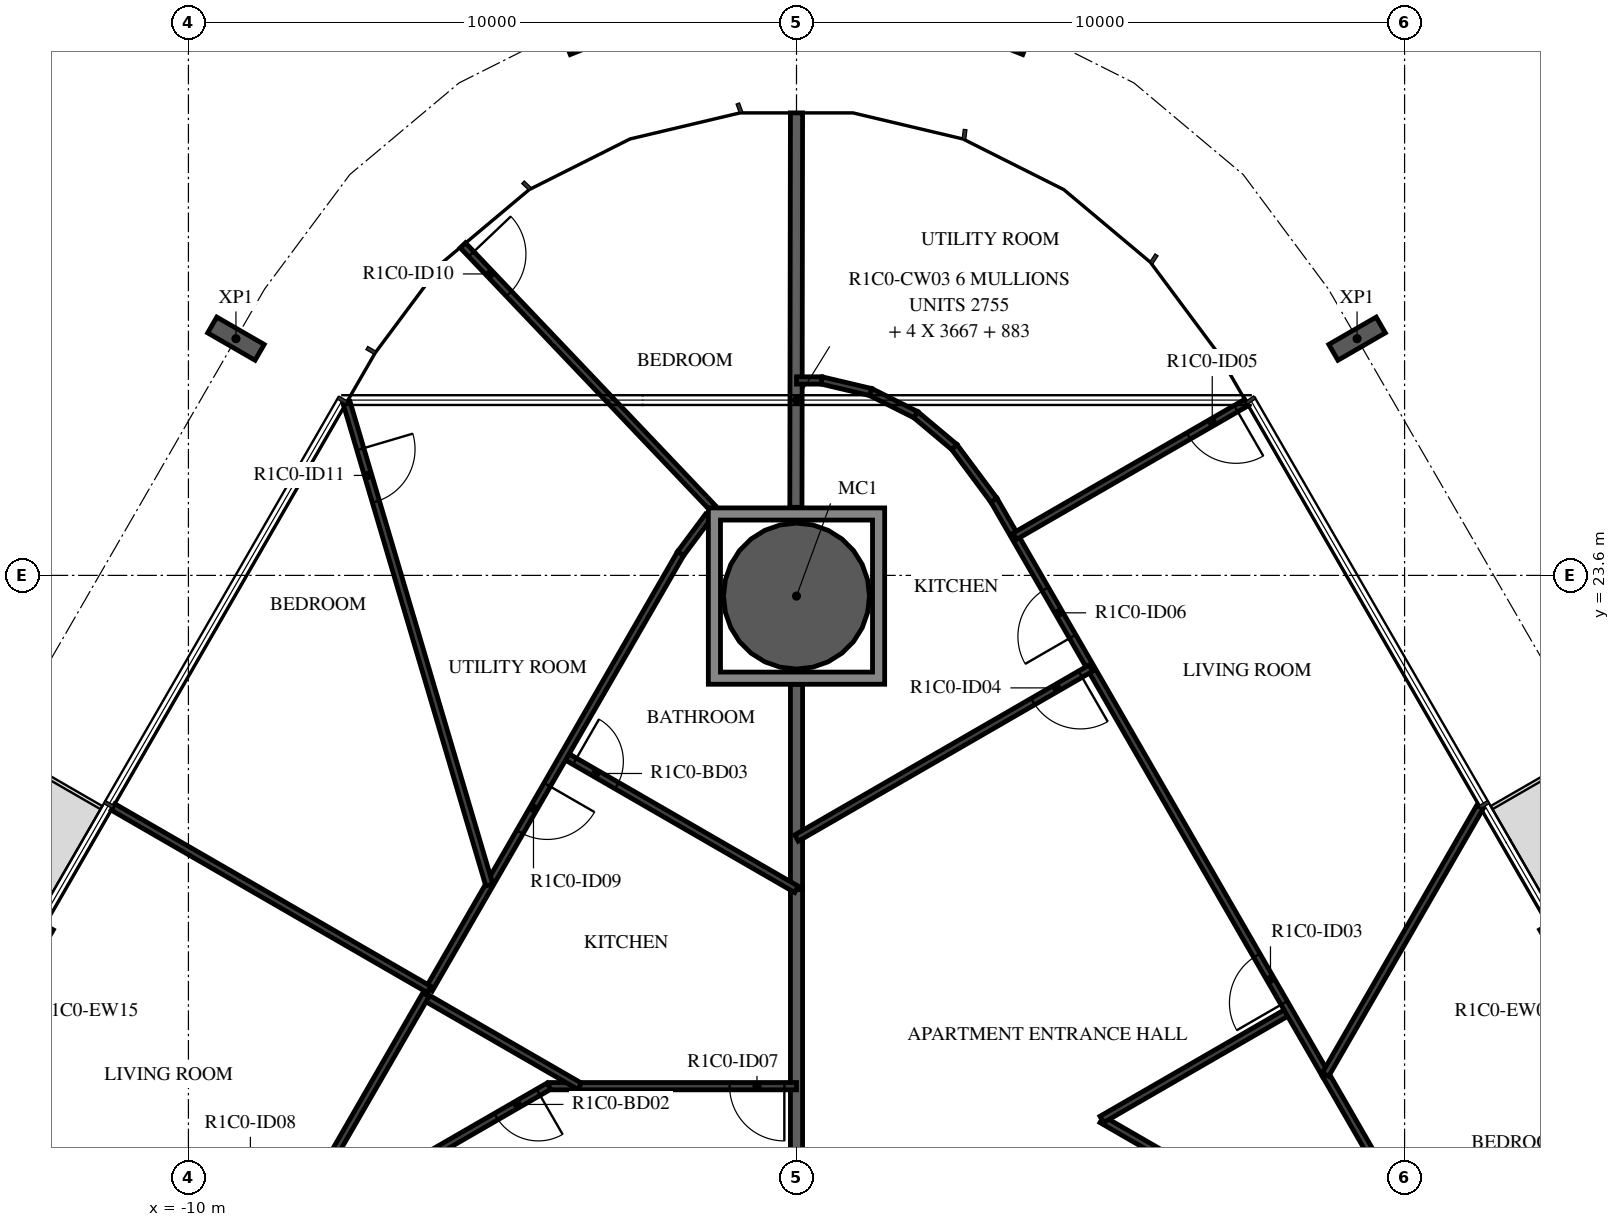
"""IFC4 building model, lengths in metres.
Left out: names, types, materials, properties, quantities, classifications, styles, units other than length and angle.
Written with IfcOpenShell. Run it as: python <this file> out.ifc"""

import sys

from ifc_helpers import new_model, si_unit, direction, frame, frame_2d, origin, origin_2d, place, context, subcontext, project, spatial, polyline, rectangle, hollow_circle, i_section, outline, extrude, element, fill, save


model = new_model("IFC4")
c1 = context("Model", 3, precision=1e-05, world=origin(), true_north=direction((0.0, 1.0)))
c2 = subcontext(c1, "Body", "Model", "MODEL_VIEW")
j1 = project(units=[si_unit("LENGTHUNIT", "METRE"), si_unit("PLANEANGLEUNIT", "RADIAN")], contexts=[c1])
p1 = place(None, origin())
s1 = spatial("IfcSite", under=j1, at=p1, CompositionType="ELEMENT")
p2 = place(p1, origin())
s2 = spatial("IfcBuilding", under=s1, at=p2, CompositionType="ELEMENT")
p3 = place(p2, frame((0.0, 0.0, 66.4)))
s3 = spatial("IfcBuildingStorey", under=s2, at=p3, CompositionType="ELEMENT", Elevation=66.4)
p4 = place(p3, frame((0.0, 23.26, -0.38), z_axis=(0.0, 0.0, 1.0), x_axis=(1.0, 0.0, 0.0)))
e1 = element("IfcColumn", 1, at=p4, inside=s3, PredefinedType="COLUMN", context=c2, shape_type="SweptSolid", body=[
    extrude(hollow_circle(Radius=1.2, WallThickness=0.06, at=origin_2d()), origin(), (0.0, 0.0, 1.0), 2.576),
])
for number, where, z_axis, x_axis in (
    (2, (9.219, 27.493, -0.38), (0.0, 0.0, 1.0), (0.5, -0.866, 0.0)),
    (3, (3.748, 32.639, -0.38), (0.0, 0.0, 1.0), (0.929, -0.371, 0.0)),
    (4, (-3.748, 32.639, -0.38), (0.0, 0.0, 1.0), (0.929, 0.371, 0.0)),
    (5, (-9.219, 27.493, -0.38), (0.0, 0.0, 1.0), (0.5, 0.866, 0.0)),
):
    element("IfcColumn", number, at=place(p3, frame(where, z_axis=z_axis, x_axis=x_axis)), inside=s3, PredefinedType="COLUMN", context=c2, shape_type="SweptSolid", body=[
        extrude(i_section(OverallWidth=0.3, OverallDepth=0.9, WebThickness=0.019, FlangeThickness=0.035, FilletRadius=0.03, at=origin_2d()), origin(), (0.0, 0.0, 1.0), 2.616),
    ])
p5 = place(p3, frame((13.891, 15.041, 0.0), z_axis=(0.0, 0.0, 1.0), x_axis=(-0.499971222258, 0.866042017984, 0.0)))
e6 = element("IfcWall", 6, at=p5, inside=s3, PredefinedType="STANDARD", context=c2, shape_type="SweptSolid", body=[
    extrude(rectangle(XDim=3.2, YDim=0.16, at=frame_2d((1.6, 0.0))), origin(), (0.0, 0.0, 1.0), 3.05),
])
p6 = place(p5, frame((0.4, 0.0, 0.0)))
e7 = element("IfcOpeningElement", 7, at=p6, cuts=e6, PredefinedType="OPENING", context=c2, shape_type="SweptSolid", body=[
    extrude(rectangle(XDim=2.4, YDim=2.4, at=frame_2d((1.2, 1.2))), frame((0.0, 0.09, 0.0), z_axis=(0.0, -1.0, 0.0), x_axis=(1.0, 0.0, 0.0)), (0.0, 0.0, 1.0), 0.18),
])
p7 = place(p3, frame((-12.291, 17.812, 0.0), z_axis=(0.0, 0.0, 1.0), x_axis=(-0.499971222258, -0.866042017984, 0.0)))
e8 = element("IfcWall", 8, at=p7, inside=s3, PredefinedType="STANDARD", context=c2, shape_type="SweptSolid", body=[
    extrude(rectangle(XDim=3.2, YDim=0.16, at=frame_2d((1.6, 0.0))), origin(), (0.0, 0.0, 1.0), 3.05),
])
p8 = place(p7, frame((0.4, 0.0, 0.0)))
e9 = element("IfcOpeningElement", 9, at=p8, cuts=e8, PredefinedType="OPENING", context=c2, shape_type="SweptSolid", body=[
    extrude(rectangle(XDim=2.4, YDim=2.4, at=frame_2d((1.2, 1.2))), frame((0.0, 0.09, 0.0), z_axis=(0.0, -1.0, 0.0), x_axis=(1.0, 0.0, 0.0)), (0.0, 0.0, 1.0), 0.18),
])
p9 = place(p3, frame((0.0, 18.437, 0.0), z_axis=(0.0, 0.0, 1.0), x_axis=(0.0, -1.0, 0.0)))
e10 = element("IfcWall", 10, at=p9, inside=s3, PredefinedType="STANDARD", context=c2, shape_type="SweptSolid", body=[
    extrude(rectangle(XDim=4.737, YDim=0.2, at=frame_2d((2.368, 0.0))), origin(), (0.0, 0.0, 1.0), 3.05),
])
p10 = place(p3, frame((0.0, 21.81, 0.0), z_axis=(0.0, 0.0, 1.0), x_axis=(0.0, -1.0, 0.0)))
e11 = element("IfcWall", 11, at=p10, inside=s3, PredefinedType="STANDARD", context=c2, shape_type="SweptSolid", body=[
    extrude(rectangle(XDim=3.373, YDim=0.2, at=frame_2d((1.687, 0.0))), origin(), (0.0, 0.0, 1.0), 3.05),
])
p11 = place(p3, frame((0.0, 31.206, 0.0), z_axis=(0.0, 0.0, 1.0), x_axis=(-0.001543266126, -0.999998809164, 0.0)))
e12 = element("IfcWall", 12, at=p11, inside=s3, PredefinedType="STANDARD", context=c2, shape_type="SweptSolid", body=[
    extrude(rectangle(XDim=6.486, YDim=0.2, at=frame_2d((3.243, 0.0))), origin(), (0.0, 0.0, 1.0), 3.05),
])
p12 = place(p3, frame((11.127, 11.127, 0.0), z_axis=(0.0, 0.0, 1.0), x_axis=(-0.86602299963, 0.500004164094, 0.0)))
e13 = element("IfcWall", 13, at=p12, inside=s3, PredefinedType="PARTITIONING", context=c2, shape_type="SweptSolid", body=[
    extrude(rectangle(XDim=7.052, YDim=0.12, at=frame_2d((3.526, 0.0))), origin(), (0.0, 0.0, 1.0), 3.05),
])
p13 = place(p12, frame((1.4, 0.0, 0.0)))
e14 = element("IfcOpeningElement", 14, at=p13, cuts=e13, PredefinedType="OPENING", context=c2, shape_type="SweptSolid", body=[
    extrude(rectangle(XDim=0.8, YDim=2.1, at=frame_2d((0.4, 1.05))), frame((0.0, 0.07, 0.0), z_axis=(0.0, -1.0, 0.0), x_axis=(1.0, 0.0, 0.0)), (0.0, 0.0, 1.0), 0.14),
])
p14 = place(p3, frame((5.02, 14.653, 0.0), z_axis=(0.0, 0.0, 1.0), x_axis=(0.866028940167, 0.499993874756, 0.0)))
e15 = element("IfcWall", 15, at=p14, inside=s3, PredefinedType="PARTITIONING", context=c2, shape_type="SweptSolid", body=[
    extrude(rectangle(XDim=3.556, YDim=0.12, at=frame_2d((1.778, 0.0))), origin(), (0.0, 0.0, 1.0), 3.05),
])
p15 = place(p3, frame((8.7, 15.392, 0.0), z_axis=(0.0, 0.0, 1.0), x_axis=(-0.500002742713, 0.866023820272, 0.0)))
e16 = element("IfcWall", 16, at=p15, inside=s3, PredefinedType="PARTITIONING", context=c2, shape_type="SweptSolid", body=[
    extrude(rectangle(XDim=10.908, YDim=0.12, at=frame_2d((5.454, 0.0))), origin(), (0.0, 0.0, 1.0), 3.05),
])
p16 = place(p15, frame((1.36, 0.0, 0.0)))
e17 = element("IfcOpeningElement", 17, at=p16, cuts=e16, PredefinedType="OPENING", context=c2, shape_type="SweptSolid", body=[
    extrude(rectangle(XDim=0.9, YDim=2.1, at=frame_2d((0.45, 1.05))), frame((0.0, 0.07, 0.0), z_axis=(0.0, -1.0, 0.0), x_axis=(1.0, 0.0, 0.0)), (0.0, 0.0, 1.0), 0.14),
])
p17 = place(p15, frame((8.317, 0.0, 0.0)))
e18 = element("IfcOpeningElement", 18, at=p17, cuts=e16, PredefinedType="OPENING", context=c2, shape_type="SweptSolid", body=[
    extrude(rectangle(XDim=0.9, YDim=2.1, at=frame_2d((0.45, 1.05))), frame((0.0, 0.07, 0.0), z_axis=(0.0, -1.0, 0.0), x_axis=(1.0, 0.0, 0.0)), (0.0, 0.0, 1.0), 0.14),
])
p18 = place(p3, frame((4.841, 22.075, 0.0), z_axis=(0.0, 0.0, 1.0), x_axis=(-0.866019751484, -0.500009789943, 0.0)))
e19 = element("IfcWall", 19, at=p18, inside=s3, PredefinedType="PARTITIONING", context=c2, shape_type="SweptSolid", body=[
    extrude(rectangle(XDim=5.59, YDim=0.12, at=frame_2d((2.795, 0.0))), origin(), (0.0, 0.0, 1.0), 3.05),
])
p19 = place(p18, frame((0.2, 0.0, 0.0)))
e20 = element("IfcOpeningElement", 20, at=p19, cuts=e19, PredefinedType="OPENING", context=c2, shape_type="SweptSolid", body=[
    extrude(rectangle(XDim=0.9, YDim=2.1, at=frame_2d((0.45, 1.05))), frame((0.0, 0.07, 0.0), z_axis=(0.0, -1.0, 0.0), x_axis=(1.0, 0.0, 0.0)), (0.0, 0.0, 1.0), 0.14),
])
p20 = place(p3, frame((8.7, 15.392, 0.0), z_axis=(0.0, 0.0, 1.0), x_axis=(0.499986106925, -0.866033424806, 0.0)))
e21 = element("IfcWall", 21, at=p20, inside=s3, PredefinedType="PARTITIONING", context=c2, shape_type="SweptSolid", body=[
    extrude(rectangle(XDim=5.317, YDim=0.12, at=frame_2d((2.659, 0.0))), origin(), (0.0, 0.0, 1.0), 3.05),
])
p21 = place(p3, frame((11.24, 19.792, 0.0), z_axis=(0.0, 0.0, 1.0), x_axis=(-0.499978956711, -0.866037552792, 0.0)))
e22 = element("IfcWall", 22, at=p21, inside=s3, PredefinedType="PARTITIONING", context=c2, shape_type="SweptSolid", body=[
    extrude(rectangle(XDim=5.081, YDim=0.12, at=frame_2d((2.541, 0.0))), origin(), (0.0, 0.0, 1.0), 3.05),
])
p22 = place(p3, frame((7.4, 26.443, 0.0), z_axis=(0.0, 0.0, 1.0), x_axis=(-0.866032203192, -0.499988222896, 0.0)))
e23 = element("IfcWall", 23, at=p22, inside=s3, PredefinedType="PARTITIONING", context=c2, shape_type="SweptSolid", body=[
    extrude(rectangle(XDim=4.4, YDim=0.12, at=frame_2d((2.2, 0.0))), origin(), (0.0, 0.0, 1.0), 3.05),
])
p23 = place(p22, frame((0.2, 0.0, 0.0)))
e24 = element("IfcOpeningElement", 24, at=p23, cuts=e23, PredefinedType="OPENING", context=c2, shape_type="SweptSolid", body=[
    extrude(rectangle(XDim=0.9, YDim=2.1, at=frame_2d((0.45, 1.05))), frame((0.0, 0.07, 0.0), z_axis=(0.0, -1.0, 0.0), x_axis=(1.0, 0.0, 0.0)), (0.0, 0.0, 1.0), 0.14),
])
p24 = place(p3, frame((0.0, 26.806, 0.0), z_axis=(0.0, 0.0, 1.0), x_axis=(1.0, 0.0, 0.0)))
e25 = element("IfcWall", 25, at=p24, inside=s3, PredefinedType="PARTITIONING", context=c2, shape_type="SweptSolid", body=[
    extrude(rectangle(XDim=0.415, YDim=0.12, at=frame_2d((0.207, 0.0))), origin(), (0.0, 0.0, 1.0), 3.05),
])
p25 = place(p3, frame((0.415, 26.806, 0.0), z_axis=(0.0, 0.0, 1.0), x_axis=(0.973048993259, -0.230598475097, 0.0)))
e26 = element("IfcWall", 26, at=p25, inside=s3, PredefinedType="PARTITIONING", context=c2, shape_type="SweptSolid", body=[
    extrude(rectangle(XDim=0.829, YDim=0.12, at=frame_2d((0.415, 0.0))), origin(), (0.0, 0.0, 1.0), 3.05),
])
for number, where, z_axis, x_axis in (
    (27, (1.221, 26.615, 0.0), (0.0, 0.0, 1.0), (0.894, -0.449, 0.0)),
    (28, (1.962, 26.243, 0.0), (0.0, 0.0, 1.0), (0.766, -0.643, 0.0)),
):
    element("IfcWall", number, at=place(p3, frame(where, z_axis=z_axis, x_axis=x_axis)), inside=s3, PredefinedType="PARTITIONING", context=c2, shape_type="SweptSolid", body=[
        extrude(rectangle(XDim=0.829, YDim=0.12, at=frame_2d((0.415, 0.0))), origin(), (0.0, 0.0, 1.0), 3.05),
    ])
p26 = place(p3, frame((2.597, 25.71, 0.0), z_axis=(0.0, 0.0, 1.0), x_axis=(0.59722925597, -0.802070580319, 0.0)))
e29 = element("IfcWall", 29, at=p26, inside=s3, PredefinedType="PARTITIONING", context=c2, shape_type="SweptSolid", body=[
    extrude(rectangle(XDim=1.087, YDim=0.12, at=frame_2d((0.543, 0.0))), origin(), (0.0, 0.0, 1.0), 3.05),
])
p27 = place(p3, frame((0.0, 15.2, 0.0), z_axis=(0.0, 0.0, 1.0), x_axis=(-1.0, 0.0, 0.0)))
e30 = element("IfcWall", 30, at=p27, inside=s3, PredefinedType="PARTITIONING", context=c2, shape_type="SweptSolid", body=[
    extrude(rectangle(XDim=4.073, YDim=0.12, at=frame_2d((2.036, 0.0))), origin(), (0.0, 0.0, 1.0), 3.05),
])
p28 = place(p27, frame((0.2, 0.0, 0.0)))
e31 = element("IfcOpeningElement", 31, at=p28, cuts=e30, PredefinedType="OPENING", context=c2, shape_type="SweptSolid", body=[
    extrude(rectangle(XDim=0.9, YDim=2.1, at=frame_2d((0.45, 1.05))), frame((0.0, 0.07, 0.0), z_axis=(0.0, -1.0, 0.0), x_axis=(1.0, 0.0, 0.0)), (0.0, 0.0, 1.0), 0.14),
])
p29 = place(p3, frame((-4.073, 15.2, 0.0), z_axis=(0.0, 0.0, 1.0), x_axis=(-0.866034514313, -0.499984219769, 0.0)))
e32 = element("IfcWall", 32, at=p29, inside=s3, PredefinedType="PARTITIONING", context=c2, shape_type="SweptSolid", body=[
    extrude(rectangle(XDim=5.006, YDim=0.12, at=frame_2d((2.503, 0.0))), origin(), (0.0, 0.0, 1.0), 3.05),
])
p30 = place(p29, frame((0.2, 0.0, 0.0)))
e33 = element("IfcOpeningElement", 33, at=p30, cuts=e32, PredefinedType="OPENING", context=c2, shape_type="SweptSolid", body=[
    extrude(rectangle(XDim=0.8, YDim=2.1, at=frame_2d((0.4, 1.05))), frame((0.0, 0.07, 0.0), z_axis=(0.0, -1.0, 0.0), x_axis=(1.0, 0.0, 0.0)), (0.0, 0.0, 1.0), 0.14),
])
p31 = place(p3, frame((-5.487, 29.028, 0.0), z_axis=(0.0, 0.0, 1.0), x_axis=(0.689189638576, -0.724581011398, 0.0)))
e34 = element("IfcWall", 34, at=p31, inside=s3, PredefinedType="PARTITIONING", context=c2, shape_type="SweptSolid", body=[
    extrude(rectangle(XDim=5.96, YDim=0.12, at=frame_2d((2.98, 0.0))), origin(), (0.0, 0.0, 1.0), 3.05),
])
p32 = place(p31, frame((0.2, 0.0, 0.0)))
e35 = element("IfcOpeningElement", 35, at=p32, cuts=e34, PredefinedType="OPENING", context=c2, shape_type="SweptSolid", body=[
    extrude(rectangle(XDim=0.9, YDim=2.1, at=frame_2d((0.45, 1.05))), frame((0.0, 0.07, 0.0), z_axis=(0.0, -1.0, 0.0), x_axis=(1.0, 0.0, 0.0)), (0.0, 0.0, 1.0), 0.14),
])
p33 = place(p3, frame((-3.821, 20.643, 0.0), z_axis=(0.0, 0.0, 1.0), x_axis=(0.866024310165, -0.5000018942, 0.0)))
e36 = element("IfcWall", 36, at=p33, inside=s3, PredefinedType="PARTITIONING", context=c2, shape_type="SweptSolid", body=[
    extrude(rectangle(XDim=4.412, YDim=0.12, at=frame_2d((2.206, 0.0))), origin(), (0.0, 0.0, 1.0), 3.05),
])
p34 = place(p33, frame((0.2, 0.0, 0.0)))
e37 = element("IfcOpeningElement", 37, at=p34, cuts=e36, PredefinedType="OPENING", context=c2, shape_type="SweptSolid", body=[
    extrude(rectangle(XDim=0.8, YDim=2.1, at=frame_2d((0.4, 1.05))), frame((0.0, 0.07, 0.0), z_axis=(0.0, -1.0, 0.0), x_axis=(1.0, 0.0, 0.0)), (0.0, 0.0, 1.0), 0.14),
])
p35 = place(p3, frame((-1.45, 24.571, 0.0), z_axis=(0.0, 0.0, 1.0), x_axis=(-0.597187509737, -0.802101663266, 0.0)))
e38 = element("IfcWall", 38, at=p35, inside=s3, PredefinedType="PARTITIONING", context=c2, shape_type="SweptSolid", body=[
    extrude(rectangle(XDim=0.765, YDim=0.12, at=frame_2d((0.382, 0.0))), origin(), (0.0, 0.0, 1.0), 3.05),
])
p36 = place(p3, frame((-1.907, 23.957, 0.0), z_axis=(0.0, 0.0, 1.0), x_axis=(-0.499994901178, -0.866028347571, 0.0)))
e39 = element("IfcWall", 39, at=p36, inside=s3, PredefinedType="PARTITIONING", context=c2, shape_type="SweptSolid", body=[
    extrude(rectangle(XDim=8.274, YDim=0.12, at=frame_2d((4.137, 0.0))), origin(), (0.0, 0.0, 1.0), 3.05),
])
p37 = place(p36, frame((4.387, 0.0, 0.0)))
e40 = element("IfcOpeningElement", 40, at=p37, cuts=e39, PredefinedType="OPENING", context=c2, shape_type="SweptSolid", body=[
    extrude(rectangle(XDim=0.9, YDim=2.1, at=frame_2d((0.45, 1.05))), frame((0.0, 0.07, 0.0), z_axis=(0.0, -1.0, 0.0), x_axis=(1.0, 0.0, 0.0)), (0.0, 0.0, 1.0), 0.14),
])
p38 = place(p3, frame((-6.114, 16.67, 0.0), z_axis=(0.0, 0.0, 1.0), x_axis=(0.866011328839, -0.500024377727, 0.0)))
e41 = element("IfcWall", 41, at=p38, inside=s3, PredefinedType="PARTITIONING", context=c2, shape_type="SweptSolid", body=[
    extrude(rectangle(XDim=2.94, YDim=0.12, at=frame_2d((1.47, 0.0))), origin(), (0.0, 0.0, 1.0), 3.05),
])
p39 = place(p3, frame((-7.4, 26.443, 0.0), z_axis=(0.0, 0.0, 1.0), x_axis=(0.283777867447, -0.95889004685, 0.0)))
e42 = element("IfcWall", 42, at=p39, inside=s3, PredefinedType="PARTITIONING", context=c2, shape_type="SweptSolid", body=[
    extrude(rectangle(XDim=8.274, YDim=0.12, at=frame_2d((4.137, 0.0))), origin(), (0.0, 0.0, 1.0), 3.05),
])
p40 = place(p39, frame((0.8, 0.0, 0.0)))
e43 = element("IfcOpeningElement", 43, at=p40, cuts=e42, PredefinedType="OPENING", context=c2, shape_type="SweptSolid", body=[
    extrude(rectangle(XDim=0.9, YDim=2.1, at=frame_2d((0.45, 1.05))), frame((0.0, 0.07, 0.0), z_axis=(0.0, -1.0, 0.0), x_axis=(1.0, 0.0, 0.0)), (0.0, 0.0, 1.0), 0.14),
])
p41 = place(p3, frame((-11.24, 19.792, 0.0), z_axis=(0.0, 0.0, 1.0), x_axis=(0.866031096941, -0.499990139034, 0.0)))
e44 = element("IfcWall", 44, at=p41, inside=s3, PredefinedType="PARTITIONING", context=c2, shape_type="SweptSolid", body=[
    extrude(rectangle(XDim=6.0, YDim=0.12, at=frame_2d((3.0, 0.0))), origin(), (0.0, 0.0, 1.0), 3.05),
])
p42 = place(p3, frame((-6.094, 16.705, 0.0), z_axis=(0.0, 0.0, 1.0), x_axis=(-0.500014747178, -0.86601688933, 0.0)))
e45 = element("IfcWall", 45, at=p42, inside=s3, PredefinedType="PARTITIONING", context=c2, shape_type="SweptSolid", body=[
    extrude(rectangle(XDim=4.627, YDim=0.12, at=frame_2d((2.313, 0.0))), origin(), (0.0, 0.0, 1.0), 3.05),
])
p43 = place(p3, origin())
e46 = element("IfcWall", 46, at=p43, inside=s3, PredefinedType="STANDARD", context=c2, shape_type="SweptSolid", body=[
    extrude(outline(polyline([(1.45, 24.71), (1.45, 21.81), (-1.45, 21.81), (-1.45, 24.71), (1.45, 24.71)]), holes=[polyline([(-1.25, 22.01), (1.25, 22.01), (1.25, 24.51), (-1.25, 24.51), (-1.25, 22.01)])]), origin(), (0.0, 0.0, 1.0), 3.05),
])
p44 = place(p16, origin())
e47 = element("IfcDoor", 47, at=p44, inside=s3, OperationType="SINGLE_SWING_RIGHT", PredefinedType="DOOR", context=c2, shape_type="SweptSolid", body=[
    extrude(rectangle(XDim=0.9, YDim=2.1, at=frame_2d((0.45, 1.05))), frame((0.0, 0.025, 0.0), z_axis=(0.0, -1.0, 0.0), x_axis=(1.0, 0.0, 0.0)), (0.0, 0.0, 1.0), 0.05),
])
fill(e17, e47)
p45 = place(p19, origin())
e48 = element("IfcDoor", 48, at=p45, inside=s3, OperationType="SINGLE_SWING_RIGHT", PredefinedType="DOOR", context=c2, shape_type="SweptSolid", body=[
    extrude(rectangle(XDim=0.9, YDim=2.1, at=frame_2d((0.45, 1.05))), frame((0.0, 0.025, 0.0), z_axis=(0.0, -1.0, 0.0), x_axis=(1.0, 0.0, 0.0)), (0.0, 0.0, 1.0), 0.05),
])
fill(e20, e48)
p46 = place(p23, origin())
e49 = element("IfcDoor", 49, at=p46, inside=s3, OperationType="SINGLE_SWING_RIGHT", PredefinedType="DOOR", context=c2, shape_type="SweptSolid", body=[
    extrude(rectangle(XDim=0.9, YDim=2.1, at=frame_2d((0.45, 1.05))), frame((0.0, 0.025, 0.0), z_axis=(0.0, -1.0, 0.0), x_axis=(1.0, 0.0, 0.0)), (0.0, 0.0, 1.0), 0.05),
])
fill(e24, e49)
p47 = place(p17, origin())
e50 = element("IfcDoor", 50, at=p47, inside=s3, OperationType="SINGLE_SWING_LEFT", PredefinedType="DOOR", context=c2, shape_type="SweptSolid", body=[
    extrude(rectangle(XDim=0.9, YDim=2.1, at=frame_2d((0.45, 1.05))), frame((0.0, 0.025, 0.0), z_axis=(0.0, -1.0, 0.0), x_axis=(1.0, 0.0, 0.0)), (0.0, 0.0, 1.0), 0.05),
])
fill(e18, e50)
p48 = place(p28, origin())
e51 = element("IfcDoor", 51, at=p48, inside=s3, OperationType="SINGLE_SWING_RIGHT", PredefinedType="DOOR", context=c2, shape_type="SweptSolid", body=[
    extrude(rectangle(XDim=0.9, YDim=2.1, at=frame_2d((0.45, 1.05))), frame((0.0, 0.025, 0.0), z_axis=(0.0, -1.0, 0.0), x_axis=(1.0, 0.0, 0.0)), (0.0, 0.0, 1.0), 0.05),
])
fill(e31, e51)
p49 = place(p30, origin())
e52 = element("IfcDoor", 52, at=p49, inside=s3, OperationType="SINGLE_SWING_LEFT", PredefinedType="DOOR", context=c2, shape_type="SweptSolid", body=[
    extrude(rectangle(XDim=0.8, YDim=2.1, at=frame_2d((0.4, 1.05))), frame((0.0, 0.025, 0.0), z_axis=(0.0, -1.0, 0.0), x_axis=(1.0, 0.0, 0.0)), (0.0, 0.0, 1.0), 0.05),
])
fill(e33, e52)
p50 = place(p34, origin())
e53 = element("IfcDoor", 53, at=p50, inside=s3, OperationType="SINGLE_SWING_LEFT", PredefinedType="DOOR", context=c2, shape_type="SweptSolid", body=[
    extrude(rectangle(XDim=0.8, YDim=2.1, at=frame_2d((0.4, 1.05))), frame((0.0, 0.025, 0.0), z_axis=(0.0, -1.0, 0.0), x_axis=(1.0, 0.0, 0.0)), (0.0, 0.0, 1.0), 0.05),
])
fill(e37, e53)
p51 = place(p37, origin())
e54 = element("IfcDoor", 54, at=p51, inside=s3, OperationType="SINGLE_SWING_LEFT", PredefinedType="DOOR", context=c2, shape_type="SweptSolid", body=[
    extrude(rectangle(XDim=0.9, YDim=2.1, at=frame_2d((0.45, 1.05))), frame((0.0, 0.025, 0.0), z_axis=(0.0, -1.0, 0.0), x_axis=(1.0, 0.0, 0.0)), (0.0, 0.0, 1.0), 0.05),
])
fill(e40, e54)
p52 = place(p32, origin())
e55 = element("IfcDoor", 55, at=p52, inside=s3, OperationType="SINGLE_SWING_LEFT", PredefinedType="DOOR", context=c2, shape_type="SweptSolid", body=[
    extrude(rectangle(XDim=0.9, YDim=2.1, at=frame_2d((0.45, 1.05))), frame((0.0, 0.025, 0.0), z_axis=(0.0, -1.0, 0.0), x_axis=(1.0, 0.0, 0.0)), (0.0, 0.0, 1.0), 0.05),
])
fill(e35, e55)
p53 = place(p40, origin())
e56 = element("IfcDoor", 56, at=p53, inside=s3, OperationType="SINGLE_SWING_RIGHT", PredefinedType="DOOR", context=c2, shape_type="SweptSolid", body=[
    extrude(rectangle(XDim=0.9, YDim=2.1, at=frame_2d((0.45, 1.05))), frame((0.0, 0.025, 0.0), z_axis=(0.0, -1.0, 0.0), x_axis=(1.0, 0.0, 0.0)), (0.0, 0.0, 1.0), 0.05),
])
fill(e43, e56)
save(model, sys.argv[1])
